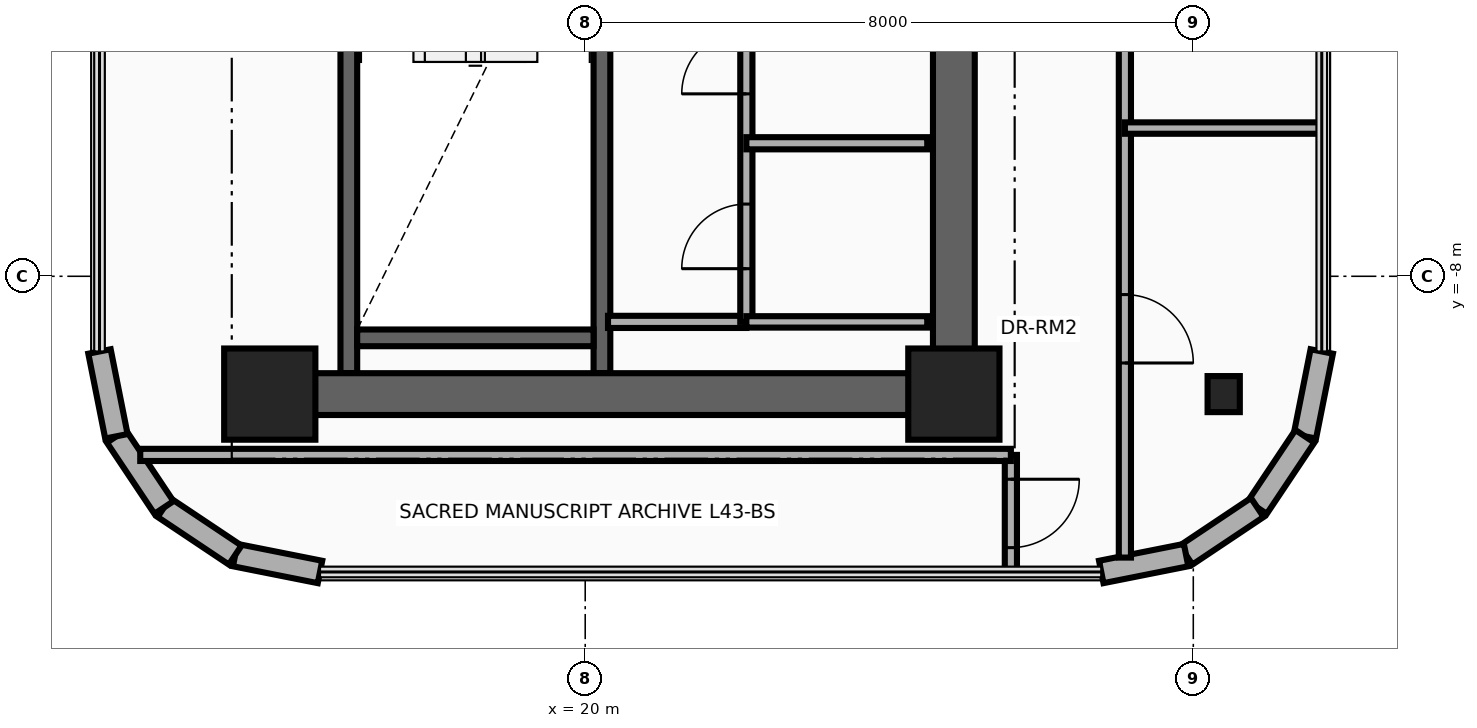
"""IFC4 building model, lengths in metres.
Left out: names, types, materials, properties, quantities, classifications, styles, units other than length and angle.
Written with IfcOpenShell. Run it as: python <this file> out.ifc"""

import sys

from ifc_helpers import new_model, si_unit, direction, frame, frame_2d, origin, origin_2d, place, context, subcontext, project, spatial, rectangle, i_section, extrude, source, transform, mapped, element, fill, save


model = new_model("IFC4")
c1 = context("Model", 3, precision=1e-05, world=origin(), true_north=direction((0.0, 1.0)))
c2 = subcontext(c1, "Body", "Model", "MODEL_VIEW")
j1 = project(units=[si_unit("LENGTHUNIT", "METRE"), si_unit("PLANEANGLEUNIT", "RADIAN")], contexts=[c1])
p1 = place(None, origin())
s1 = spatial("IfcSite", under=j1, at=p1, CompositionType="ELEMENT")
p2 = place(p1, origin())
s2 = spatial("IfcBuilding", under=s1, at=p2, CompositionType="ELEMENT")
p3 = place(p2, frame((0.0, 0.0, 168.6)))
s3 = spatial("IfcBuildingStorey", under=s2, at=p3, CompositionType="ELEMENT", Elevation=168.6)
for number, where, z_axis, x_axis in (
    (1, (16.89, -9.275, 0.0), (0.0, 0.0, 1.0), (0.0, 1.0, 0.0)),
    (2, (20.22, -9.275, 0.0), (0.0, 0.0, 1.0), (0.0, 1.0, 0.0)),
):
    element("IfcWall", number, at=place(p3, frame(where, z_axis=z_axis, x_axis=x_axis)), inside=s3, PredefinedType="SHEAR", context=c2, shape_type="SweptSolid", body=[
        extrude(rectangle(XDim=8.595, YDim=0.22, at=frame_2d((4.297, 0.0))), origin(), (0.0, 0.0, 1.0), 3.3),
    ])
p4 = place(p3, frame((17.0, -8.81, 0.0), z_axis=(0.0, 0.0, 1.0), x_axis=(1.0, 0.0, 0.0)))
e3 = element("IfcWall", 3, at=p4, inside=s3, PredefinedType="SHEAR", context=c2, shape_type="SweptSolid", body=[
    extrude(rectangle(XDim=3.11, YDim=0.22, at=frame_2d((1.555, 0.0))), origin(), (0.0, 0.0, 1.0), 3.3),
])
p5 = place(p3, frame((24.85, -9.825, 0.0), z_axis=(0.0, 0.0, 1.0), x_axis=(0.0, 1.0, 0.0)))
e4 = element("IfcWall", 4, at=p5, inside=s3, PredefinedType="SHEAR", context=c2, shape_type="SweptSolid", body=[
    extrude(rectangle(XDim=8.875, YDim=0.55, at=frame_2d((4.438, 0.0))), origin(), (0.0, 0.0, 1.0), 3.3),
])
p6 = place(p3, frame((15.85, -9.55, 0.0), z_axis=(0.0, 0.0, 1.0), x_axis=(1.0, 0.0, 0.0)))
e5 = element("IfcWall", 5, at=p6, inside=s3, PredefinedType="SHEAR", context=c2, shape_type="SweptSolid", body=[
    extrude(rectangle(XDim=9.0, YDim=0.55, at=frame_2d((4.5, 0.0))), origin(), (0.0, 0.0, 1.0), 3.3),
])
m1 = source(origin(), c2, "Body", "SweptSolid", [
    extrude(rectangle(XDim=1.2, YDim=1.2, at=origin_2d()), origin(), (0.0, 0.0, 1.0), 3.7),
])
for number, where, z_axis, x_axis in (
    (6, (15.85, -9.55, 0.0), (0.0, 0.0, 1.0), (1.0, 0.0, 0.0)),
    (7, (24.85, -9.55, 0.0), (0.0, 0.0, 1.0), (1.0, 0.0, 0.0)),
):
    element("IfcColumn", number, at=place(p3, frame(where, z_axis=z_axis, x_axis=x_axis)), inside=s3, PredefinedType="COLUMN", context=c2, shape_type="MappedRepresentation", body=[
        mapped(m1, transform((0.0, 0.0, 0.0), x_axis=(1.0, 0.0, 0.0), y_axis=(0.0, 1.0, 0.0), z_axis=(0.0, 0.0, 1.0), scale=1.0)),
    ])
m2 = source(origin(), c2, "Body", "SweptSolid", [
    extrude(i_section(OverallWidth=0.424, OverallDepth=0.474, WebThickness=0.048, FlangeThickness=0.077, at=origin_2d()), origin(), (0.0, 0.0, 1.0), 3.7),
])
p7 = place(p3, frame((28.4, -9.55, 0.0), z_axis=(0.0, 0.0, 1.0), x_axis=(1.0, 0.0, 0.0)))
e8 = element("IfcColumn", 8, at=p7, inside=s3, PredefinedType="COLUMN", context=c2, shape_type="MappedRepresentation", body=[
    mapped(m2, transform((0.0, 0.0, 0.0), x_axis=(1.0, 0.0, 0.0), y_axis=(0.0, 1.0, 0.0), z_axis=(0.0, 0.0, 1.0), scale=1.0)),
])
p8 = place(p3, frame((29.69, -8.989, 0.0), z_axis=(0.0, 0.0, 1.0), x_axis=(-0.195043173023, -0.980794657743, 0.0)))
e9 = element("IfcWall", 9, at=p8, inside=s3, PredefinedType="SOLIDWALL", context=c2, shape_type="SweptSolid", body=[
    extrude(rectangle(XDim=1.138, YDim=0.3, at=frame_2d((0.569, 0.0))), origin(), (0.0, 0.0, 1.0), 3.3),
])
for number, where, z_axis, x_axis in (
    (10, (29.468, -10.105, 0.0), (0.0, 0.0, 1.0), (-0.556, -0.831, 0.0)),
    (11, (28.842, -11.042, 0.0), (0.0, 0.0, 1.0), (-0.831, -0.556, 0.0)),
):
    element("IfcWall", number, at=place(p3, frame(where, z_axis=z_axis, x_axis=x_axis)), inside=s3, PredefinedType="SOLIDWALL", context=c2, shape_type="SweptSolid", body=[
        extrude(rectangle(XDim=1.127, YDim=0.3, at=frame_2d((0.563, 0.0))), origin(), (0.0, 0.0, 1.0), 3.3),
    ])
for number, where, z_axis, x_axis in (
    (12, (27.905, -11.668, 0.0), (0.0, 0.0, 1.0), (-0.981, -0.195, 0.0)),
    (13, (16.511, -11.89, 0.0), (0.0, 0.0, 1.0), (-0.981, 0.195, 0.0)),
):
    element("IfcWall", number, at=place(p3, frame(where, z_axis=z_axis, x_axis=x_axis)), inside=s3, PredefinedType="SOLIDWALL", context=c2, shape_type="SweptSolid", body=[
        extrude(rectangle(XDim=1.138, YDim=0.3, at=frame_2d((0.569, 0.0))), origin(), (0.0, 0.0, 1.0), 3.3),
    ])
for number, where, z_axis, x_axis in (
    (14, (15.395, -11.668, 0.0), (0.0, 0.0, 1.0), (-0.831, 0.556, 0.0)),
    (15, (14.458, -11.042, 0.0), (0.0, 0.0, 1.0), (-0.556, 0.831, 0.0)),
):
    element("IfcWall", number, at=place(p3, frame(where, z_axis=z_axis, x_axis=x_axis)), inside=s3, PredefinedType="SOLIDWALL", context=c2, shape_type="SweptSolid", body=[
        extrude(rectangle(XDim=1.127, YDim=0.3, at=frame_2d((0.563, 0.0))), origin(), (0.0, 0.0, 1.0), 3.3),
    ])
p9 = place(p3, frame((13.832, -10.105, 0.0), z_axis=(0.0, 0.0, 1.0), x_axis=(-0.195043173023, 0.980794657743, 0.0)))
e16 = element("IfcWall", 16, at=p9, inside=s3, PredefinedType="SOLIDWALL", context=c2, shape_type="SweptSolid", body=[
    extrude(rectangle(XDim=1.138, YDim=0.3, at=frame_2d((0.569, 0.0))), origin(), (0.0, 0.0, 1.0), 3.3),
])
p10 = place(p3, frame((20.3, -8.6, 0.0), z_axis=(0.0, 0.0, 1.0), x_axis=(1.0, 0.0, 0.0)))
e17 = element("IfcWall", 17, at=p10, inside=s3, PredefinedType="PARTITIONING", context=c2, shape_type="SweptSolid", body=[
    extrude(rectangle(XDim=1.82, YDim=0.16, at=frame_2d((0.91, 0.0))), origin(), (0.0, 0.0, 1.0), 3.3),
])
p11 = place(p3, frame((22.12, -8.6, 0.0), z_axis=(0.0, 0.0, 1.0), x_axis=(0.0, 1.0, 0.0)))
e18 = element("IfcWall", 18, at=p11, inside=s3, PredefinedType="PARTITIONING", context=c2, shape_type="SweptSolid", body=[
    extrude(rectangle(XDim=4.65, YDim=0.16, at=frame_2d((2.325, 0.0))), origin(), (0.0, 0.0, 1.0), 3.3),
])
p12 = place(p11, frame((0.7, 0.0, 0.0)))
e19 = element("IfcOpeningElement", 19, at=p12, cuts=e18, PredefinedType="OPENING", context=c2, shape_type="SweptSolid", body=[
    extrude(rectangle(XDim=0.85, YDim=2.05, at=frame_2d((0.425, 1.025))), frame((0.0, 0.095, 0.0), z_axis=(0.0, -1.0, 0.0), x_axis=(1.0, 0.0, 0.0)), (0.0, 0.0, 1.0), 0.19),
])
p13 = place(p11, frame((3.0, 0.0, 0.0)))
e20 = element("IfcOpeningElement", 20, at=p13, cuts=e18, PredefinedType="OPENING", context=c2, shape_type="SweptSolid", body=[
    extrude(rectangle(XDim=0.85, YDim=2.05, at=frame_2d((0.425, 1.025))), frame((0.0, 0.095, 0.0), z_axis=(0.0, -1.0, 0.0), x_axis=(1.0, 0.0, 0.0)), (0.0, 0.0, 1.0), 0.19),
])
p14 = place(p3, frame((22.12, -8.6, 0.0), z_axis=(0.0, 0.0, 1.0), x_axis=(1.0, 0.0, 0.0)))
e21 = element("IfcWall", 21, at=p14, inside=s3, PredefinedType="PARTITIONING", context=c2, shape_type="SweptSolid", body=[
    extrude(rectangle(XDim=2.38, YDim=0.15, at=frame_2d((1.19, 0.0))), origin(), (0.0, 0.0, 1.0), 3.3),
])
p15 = place(p3, frame((22.12, -6.25, 0.0), z_axis=(0.0, 0.0, 1.0), x_axis=(1.0, 0.0, 0.0)))
e22 = element("IfcWall", 22, at=p15, inside=s3, PredefinedType="PARTITIONING", context=c2, shape_type="SweptSolid", body=[
    extrude(rectangle(XDim=2.38, YDim=0.16, at=frame_2d((1.19, 0.0))), origin(), (0.0, 0.0, 1.0), 3.3),
])
p16 = place(p3, frame((25.6, -11.89, 0.0), z_axis=(0.0, 0.0, 1.0), x_axis=(0.0, 1.0, 0.0)))
e23 = element("IfcWall", 23, at=p16, inside=s3, PredefinedType="PARTITIONING", context=c2, shape_type="SweptSolid", body=[
    extrude(rectangle(XDim=1.54, YDim=0.16, at=frame_2d((0.77, 0.0))), origin(), (0.0, 0.0, 1.0), 3.3),
])
p17 = place(p16, frame((0.32, 0.0, 0.0)))
e24 = element("IfcOpeningElement", 24, at=p17, cuts=e23, PredefinedType="OPENING", context=c2, shape_type="SweptSolid", body=[
    extrude(rectangle(XDim=0.9, YDim=2.1, at=frame_2d((0.45, 1.05))), frame((0.0, 0.095, 0.0), z_axis=(0.0, -1.0, 0.0), x_axis=(1.0, 0.0, 0.0)), (0.0, 0.0, 1.0), 0.19),
])
p18 = place(p3, frame((14.146, -10.35, 0.0), z_axis=(0.0, 0.0, 1.0), x_axis=(1.0, 0.0, 0.0)))
e25 = element("IfcWall", 25, at=p18, inside=s3, PredefinedType="PARTITIONING", context=c2, shape_type="SweptSolid", body=[
    extrude(rectangle(XDim=11.454, YDim=0.16, at=frame_2d((5.727, 0.0))), origin(), (0.0, 0.0, 1.0), 3.3),
])
p19 = place(p3, frame((27.1, -11.701, 0.0), z_axis=(0.0, 0.0, 1.0), x_axis=(0.0, 1.0, 0.0)))
e26 = element("IfcWall", 26, at=p19, inside=s3, PredefinedType="PARTITIONING", context=c2, shape_type="SweptSolid", body=[
    extrude(rectangle(XDim=23.551, YDim=0.16, at=frame_2d((11.775, 0.0))), origin(), (0.0, 0.0, 1.0), 2.085),
])
p20 = place(p19, frame((2.56, 0.0, 0.0)))
e27 = element("IfcOpeningElement", 27, at=p20, cuts=e26, PredefinedType="OPENING", context=c2, shape_type="SweptSolid", body=[
    extrude(rectangle(XDim=0.9, YDim=2.04, at=frame_2d((0.45, 1.02))), frame((0.0, 0.095, 0.0), z_axis=(0.0, -1.0, 0.0), x_axis=(1.0, 0.0, 0.0)), (0.0, 0.0, 1.0), 0.19),
])
p21 = place(p19, frame((9.676, 0.0, 0.0)))
e28 = element("IfcOpeningElement", 28, at=p21, cuts=e26, PredefinedType="OPENING", context=c2, shape_type="SweptSolid", body=[
    extrude(rectangle(XDim=0.9, YDim=2.04, at=frame_2d((0.45, 1.02))), frame((0.0, 0.095, 0.0), z_axis=(0.0, -1.0, 0.0), x_axis=(1.0, 0.0, 0.0)), (0.0, 0.0, 1.0), 0.19),
])
p22 = place(p19, frame((18.626, 0.0, 0.0)))
e29 = element("IfcOpeningElement", 29, at=p22, cuts=e26, PredefinedType="OPENING", context=c2, shape_type="SweptSolid", body=[
    extrude(rectangle(XDim=0.9, YDim=2.04, at=frame_2d((0.45, 1.02))), frame((0.0, 0.095, 0.0), z_axis=(0.0, -1.0, 0.0), x_axis=(1.0, 0.0, 0.0)), (0.0, 0.0, 1.0), 0.19),
])
p23 = place(p3, frame((27.1, -6.05, 0.0), z_axis=(0.0, 0.0, 1.0), x_axis=(1.0, 0.0, 0.0)))
e30 = element("IfcWall", 30, at=p23, inside=s3, PredefinedType="PARTITIONING", context=c2, shape_type="SweptSolid", body=[
    extrude(rectangle(XDim=2.59, YDim=0.15, at=frame_2d((1.295, 0.0))), origin(), (0.0, 0.0, 1.0), 2.746),
])
p24 = place(p12, origin())
e31 = element("IfcDoor", 31, at=p24, inside=s3, OperationType="SINGLE_SWING_RIGHT", PredefinedType="DOOR", context=c2, shape_type="SweptSolid", body=[
    extrude(rectangle(XDim=0.85, YDim=2.05, at=frame_2d((0.425, 1.025))), frame((0.0, 0.025, 0.0), z_axis=(0.0, -1.0, 0.0), x_axis=(1.0, 0.0, 0.0)), (0.0, 0.0, 1.0), 0.05),
])
fill(e19, e31)
p25 = place(p13, origin())
e32 = element("IfcDoor", 32, at=p25, inside=s3, OperationType="SINGLE_SWING_LEFT", PredefinedType="DOOR", context=c2, shape_type="SweptSolid", body=[
    extrude(rectangle(XDim=0.85, YDim=2.05, at=frame_2d((0.425, 1.025))), frame((0.0, 0.025, 0.0), z_axis=(0.0, -1.0, 0.0), x_axis=(1.0, 0.0, 0.0)), (0.0, 0.0, 1.0), 0.05),
])
fill(e20, e32)
p26 = place(p17, frame((0.9, 0.0, 0.0), z_axis=(0.0, 0.0, 1.0), x_axis=(-1.0, 0.0, 0.0)))
e33 = element("IfcDoor", 33, at=p26, inside=s3, OperationType="SINGLE_SWING_LEFT", PredefinedType="DOOR", context=c2, shape_type="SweptSolid", body=[
    extrude(rectangle(XDim=0.9, YDim=2.1, at=frame_2d((0.45, 1.05))), frame((0.0, 0.025, 0.0), z_axis=(0.0, -1.0, 0.0), x_axis=(1.0, 0.0, 0.0)), (0.0, 0.0, 1.0), 0.05),
])
fill(e24, e33)
p27 = place(p20, frame((0.9, 0.0, 0.0), z_axis=(0.0, 0.0, 1.0), x_axis=(-1.0, 0.0, 0.0)))
e34 = element("IfcDoor", 34, at=p27, inside=s3, OperationType="SINGLE_SWING_LEFT", PredefinedType="DOOR", context=c2, shape_type="SweptSolid", body=[
    extrude(rectangle(XDim=0.9, YDim=2.04, at=frame_2d((0.45, 1.02))), frame((0.0, 0.025, 0.0), z_axis=(0.0, -1.0, 0.0), x_axis=(1.0, 0.0, 0.0)), (0.0, 0.0, 1.0), 0.05),
])
fill(e27, e34)
save(model, sys.argv[1])
